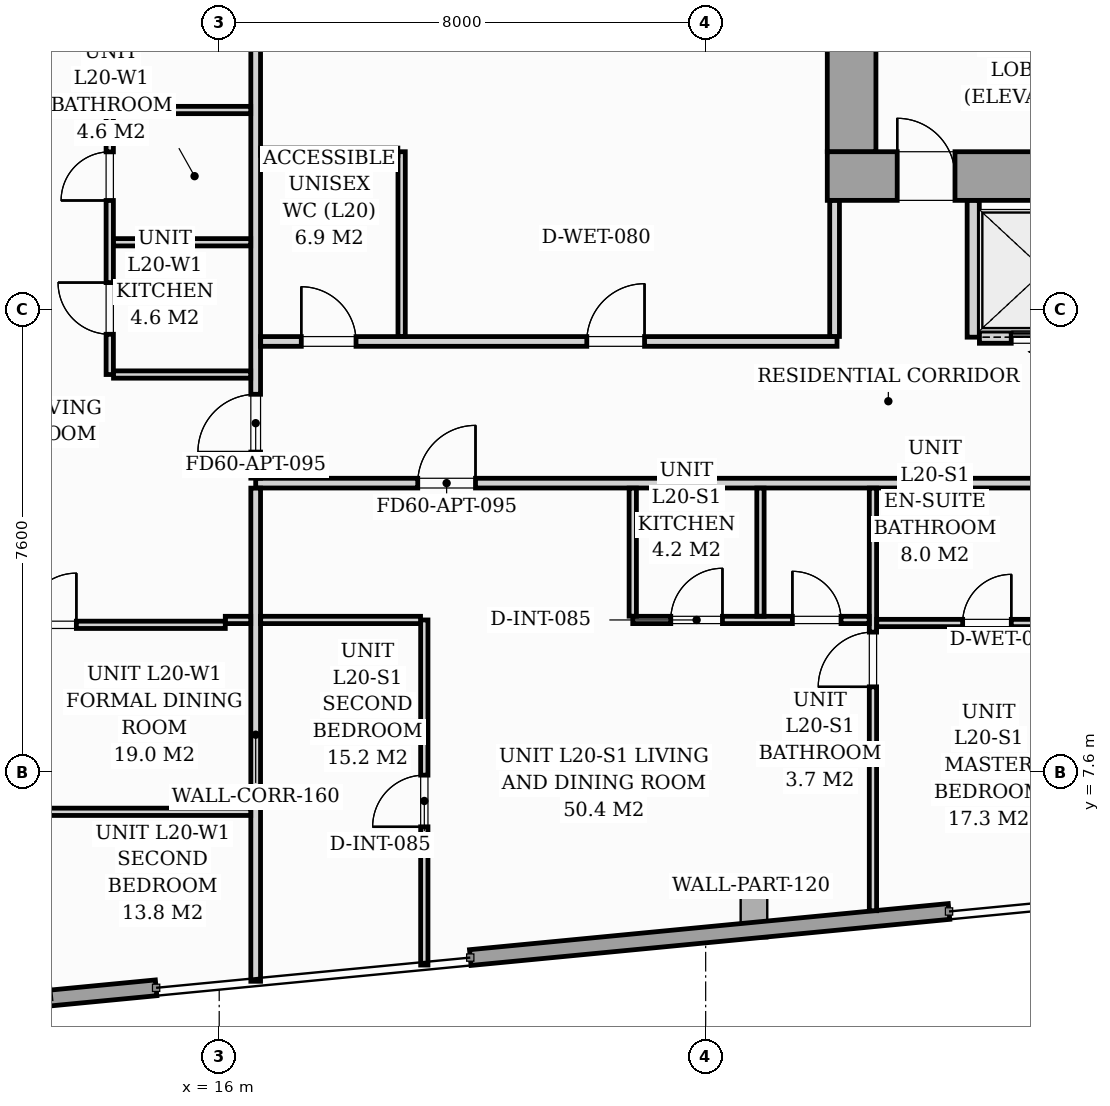
"""IFC4 building model, lengths in metres.
Left out: names, types, materials, properties, quantities, classifications, styles, units other than length and angle.
Written with IfcOpenShell. Run it as: python <this file> out.ifc"""

import sys

from ifc_helpers import new_model, si_unit, direction, frame, frame_2d, origin, origin_2d, place, context, subcontext, project, spatial, rectangle, i_section, extrude, source, transform, mapped, element, fill, save


model = new_model("IFC4")
c1 = context("Model", 3, precision=1e-05, world=origin(), true_north=direction((0.0, 1.0)))
c2 = subcontext(c1, "Body", "Model", "MODEL_VIEW")
j1 = project(units=[si_unit("LENGTHUNIT", "METRE"), si_unit("PLANEANGLEUNIT", "RADIAN")], contexts=[c1])
p1 = place(None, origin())
s1 = spatial("IfcSite", under=j1, at=p1, CompositionType="ELEMENT")
p2 = place(p1, origin())
s2 = spatial("IfcBuilding", under=s1, at=p2, CompositionType="ELEMENT")
p3 = place(p2, frame((0.0, 0.0, 72.6)))
s3 = spatial("IfcBuildingStorey", under=s2, at=p3, CompositionType="ELEMENT", Elevation=72.6)
m1 = source(origin(), c2, "Body", "SweptSolid", [
    extrude(i_section(OverallWidth=0.427, OverallDepth=0.483, WebThickness=0.051, FlangeThickness=0.082, FilletRadius=0.018, at=origin_2d()), origin(), (0.0, 0.0, 1.0), 5.196),
])
p4 = place(p3, frame((26.4, 17.4, 0.002), z_axis=(0.0, 0.0, 1.0), x_axis=(1.0, 0.0, 0.0)))
e1 = element("IfcColumn", 1, at=p4, inside=s3, PredefinedType="PILASTER", context=c2, shape_type="MappedRepresentation", body=[
    mapped(m1, transform((0.0, 0.0, 0.0), scale=1.0)),
])
m2 = source(origin(), c2, "Body", "SweptSolid", [
    extrude(i_section(OverallWidth=0.438, OverallDepth=1.011, WebThickness=0.041, FlangeThickness=0.074, FilletRadius=0.024, at=origin_2d()), origin(), (0.0, 0.0, 1.0), 5.085),
])
p5 = place(p3, frame((11.735, 4.458, 0.108), z_axis=(0.428528444191, 0.106003899258, 0.897288440727), x_axis=(-0.871034557512, -0.215465415974, 0.44144473509)))
e2 = element("IfcColumn", 2, at=p5, inside=s3, PredefinedType="COLUMN", context=c2, shape_type="MappedRepresentation", body=[
    mapped(m2, transform((0.0, 0.0, 0.0), scale=1.0)),
])
m3 = source(origin(), c2, "Body", "SweptSolid", [
    extrude(i_section(OverallWidth=0.438, OverallDepth=1.011, WebThickness=0.041, FlangeThickness=0.074, FilletRadius=0.024, at=origin_2d()), origin(), (0.0, 0.0, 1.0), 5.424),
])
p6 = place(p3, frame((24.135, 5.106, 0.133), z_axis=(0.514107031912, 0.207605431326, 0.832222292793), x_axis=(-0.771678997149, -0.311617505897, 0.554442111837)))
e3 = element("IfcColumn", 3, at=p6, inside=s3, PredefinedType="COLUMN", context=c2, shape_type="MappedRepresentation", body=[
    mapped(m3, transform((0.0, 0.0, 0.0), scale=1.0)),
])
p7 = place(p3, frame((28.002, 5.306, 0.0), z_axis=(0.0, 0.0, 1.0), x_axis=(-0.9953942011, -0.09586649267, 0.0)))
e4 = element("IfcWall", 4, at=p7, inside=s3, PredefinedType="STANDARD", context=c2, shape_type="SweptSolid", body=[
    extrude(rectangle(XDim=7.91, YDim=0.26, at=frame_2d((3.955, 0.0))), origin(), (0.0, 0.0, 1.0), 4.78),
])
p8 = place(p3, frame((14.962, 4.051, 0.0), z_axis=(0.0, 0.0, 1.0), x_axis=(-0.995397839199, -0.095828710298, 0.0)))
e5 = element("IfcWall", 5, at=p8, inside=s3, PredefinedType="STANDARD", context=c2, shape_type="SweptSolid", body=[
    extrude(rectangle(XDim=2.0, YDim=0.26, at=frame_2d((1.0, 0.0))), origin(), (0.0, 0.0, 1.0), 4.78),
])
p9 = place(p3, frame((26.0, 17.4, 0.0), z_axis=(0.0, 0.0, 1.0), x_axis=(1.0, 0.0, 0.0)))
e6 = element("IfcWall", 6, at=p9, inside=s3, PredefinedType="SHEAR", context=c2, shape_type="SweptSolid", body=[
    extrude(rectangle(XDim=20.0, YDim=0.8, at=frame_2d((10.0, 0.0))), origin(), (0.0, 0.0, 1.0), 5.2),
])
p10 = place(p9, frame((1.15, 0.0, 0.0)))
e7 = element("IfcOpeningElement", 7, at=p10, cuts=e6, PredefinedType="OPENING", context=c2, shape_type="SweptSolid", body=[
    extrude(rectangle(XDim=0.95, YDim=2.06, at=frame_2d((0.475, 1.03))), frame((0.0, 0.41, 0.0), z_axis=(0.0, -1.0, 0.0), x_axis=(1.0, 0.0, 0.0)), (0.0, 0.0, 1.0), 0.82),
])
p11 = place(p9, frame((9.58, 0.0, 0.0)))
e8 = element("IfcOpeningElement", 8, at=p11, cuts=e6, PredefinedType="OPENING", context=c2, shape_type="SweptSolid", body=[
    extrude(rectangle(XDim=0.9, YDim=2.06, at=frame_2d((0.45, 1.03))), frame((0.0, 0.41, 0.0), z_axis=(0.0, -1.0, 0.0), x_axis=(1.0, 0.0, 0.0)), (0.0, 0.0, 1.0), 0.82),
])
p12 = place(p9, frame((17.75, 0.0, 0.0)))
e9 = element("IfcOpeningElement", 9, at=p12, cuts=e6, PredefinedType="OPENING", context=c2, shape_type="SweptSolid", body=[
    extrude(rectangle(XDim=0.95, YDim=2.06, at=frame_2d((0.475, 1.03))), frame((0.0, 0.41, 0.0), z_axis=(0.0, -1.0, 0.0), x_axis=(1.0, 0.0, 0.0)), (0.0, 0.0, 1.0), 0.82),
])
p13 = place(p3, frame((26.4, 17.802, 0.0), z_axis=(0.0, 0.0, 1.0), x_axis=(0.0, 1.0, 0.0)))
e10 = element("IfcWall", 10, at=p13, inside=s3, PredefinedType="SHEAR", context=c2, shape_type="SweptSolid", body=[
    extrude(rectangle(XDim=5.796, YDim=0.8, at=frame_2d((2.898, 0.0))), origin(), (0.0, 0.0, 1.0), 5.2),
])
p14 = place(p3, frame((28.4, 14.75, 0.0), z_axis=(0.0, 0.0, 1.0), x_axis=(0.0, 1.0, 0.0)))
e11 = element("IfcWall", 11, at=p14, inside=s3, PredefinedType="PARTITIONING", context=c2, shape_type="SweptSolid", body=[
    extrude(rectangle(XDim=2.248, YDim=0.2, at=frame_2d((1.124, 0.0))), origin(), (0.0, 0.0, 1.0), 4.78),
])
p15 = place(p3, frame((28.502, 14.75, 0.0), z_axis=(0.0, 0.0, 1.0), x_axis=(1.0, 0.0, 0.0)))
e12 = element("IfcWall", 12, at=p15, inside=s3, PredefinedType="PARTITIONING", context=c2, shape_type="SweptSolid", body=[
    extrude(rectangle(XDim=2.146, YDim=0.2, at=frame_2d((1.073, 0.0))), origin(), (0.0, 0.0, 1.0), 4.78),
])
p16 = place(p15, frame((0.523, 0.0, 0.0)))
e13 = element("IfcOpeningElement", 13, at=p16, cuts=e12, PredefinedType="OPENING", context=c2, shape_type="SweptSolid", body=[
    extrude(rectangle(XDim=1.05, YDim=2.08, at=frame_2d((0.525, 1.04))), frame((0.0, 0.11, 0.0), z_axis=(0.0, -1.0, 0.0), x_axis=(1.0, 0.0, 0.0)), (0.0, 0.0, 1.0), 0.22),
])
p17 = place(p3, frame((16.6, 12.35, 0.0), z_axis=(0.0, 0.0, 1.0), x_axis=(1.0, 0.0, 0.0)))
e14 = element("IfcWall", 14, at=p17, inside=s3, PredefinedType="PARTITIONING", context=c2, shape_type="SweptSolid", body=[
    extrude(rectangle(XDim=37.6, YDim=0.16, at=frame_2d((18.8, 0.0))), origin(), (0.0, 0.0, 1.0), 4.78),
])
p18 = place(p17, frame((2.665, 0.0, 0.0)))
e15 = element("IfcOpeningElement", 15, at=p18, cuts=e14, PredefinedType="OPENING", context=c2, shape_type="SweptSolid", body=[
    extrude(rectangle(XDim=0.95, YDim=2.06, at=frame_2d((0.475, 1.03))), frame((0.0, 0.09, 0.0), z_axis=(0.0, -1.0, 0.0), x_axis=(1.0, 0.0, 0.0)), (0.0, 0.0, 1.0), 0.18),
])
p19 = place(p17, frame((26.146, 0.0, 0.0)))
e16 = element("IfcOpeningElement", 16, at=p19, cuts=e14, PredefinedType="OPENING", context=c2, shape_type="SweptSolid", body=[
    extrude(rectangle(XDim=0.95, YDim=2.06, at=frame_2d((0.475, 1.03))), frame((0.0, 0.09, 0.0), z_axis=(0.0, -1.0, 0.0), x_axis=(1.0, 0.0, 0.0)), (0.0, 0.0, 1.0), 0.18),
])
p20 = place(p3, frame((16.6, 4.158, 0.0), z_axis=(0.0, 0.0, 1.0), x_axis=(0.0, 1.0, 0.0)))
e17 = element("IfcWall", 17, at=p20, inside=s3, PredefinedType="PARTITIONING", context=c2, shape_type="SweptSolid", body=[
    extrude(rectangle(XDim=8.11, YDim=0.16, at=frame_2d((4.055, 0.0))), origin(), (0.0, 0.0, 1.0), 4.78),
])
p21 = place(p3, frame((16.6, 12.432, 0.0), z_axis=(0.0, 0.0, 1.0), x_axis=(0.0, 1.0, 0.0)))
e18 = element("IfcWall", 18, at=p21, inside=s3, PredefinedType="PARTITIONING", context=c2, shape_type="SweptSolid", body=[
    extrude(rectangle(XDim=11.658, YDim=0.16, at=frame_2d((5.829, 0.0))), origin(), (0.0, 0.0, 1.0), 4.78),
])
p22 = place(p21, frame((0.429, 0.0, 0.0)))
e19 = element("IfcOpeningElement", 19, at=p22, cuts=e18, PredefinedType="OPENING", context=c2, shape_type="SweptSolid", body=[
    extrude(rectangle(XDim=0.95, YDim=2.06, at=frame_2d((0.475, 1.03))), frame((0.0, 0.09, 0.0), z_axis=(0.0, -1.0, 0.0), x_axis=(1.0, 0.0, 0.0)), (0.0, 0.0, 1.0), 0.18),
])
p23 = place(p3, frame((26.751, 5.318, 0.0), z_axis=(0.0, 0.0, 1.0), x_axis=(0.0, 1.0, 0.0)))
e20 = element("IfcWall", 20, at=p23, inside=s3, PredefinedType="PARTITIONING", context=c2, shape_type="SweptSolid", body=[
    extrude(rectangle(XDim=6.95, YDim=0.12, at=frame_2d((3.475, 0.0))), origin(), (0.0, 0.0, 1.0), 4.055),
])
p24 = place(p23, frame((3.682, 0.0, 0.0)))
e21 = element("IfcOpeningElement", 21, at=p24, cuts=e20, PredefinedType="OPENING", context=c2, shape_type="SweptSolid", body=[
    extrude(rectangle(XDim=0.9, YDim=2.05, at=frame_2d((0.45, 1.025))), frame((0.0, 0.07, 0.0), z_axis=(0.0, -1.0, 0.0), x_axis=(1.0, 0.0, 0.0)), (0.0, 0.0, 1.0), 0.14),
])
p25 = place(p3, frame((22.801, 10.1, 0.0), z_axis=(0.0, 0.0, 1.0), x_axis=(1.0, 0.0, 0.0)))
e22 = element("IfcWall", 22, at=p25, inside=s3, PredefinedType="PARTITIONING", context=c2, shape_type="SweptSolid", body=[
    extrude(rectangle(XDim=3.888, YDim=0.12, at=frame_2d((1.944, 0.0))), origin(), (0.0, 0.0, 1.0), 4.78),
])
p26 = place(p25, frame((0.625, 0.0, 0.0)))
e23 = element("IfcOpeningElement", 23, at=p26, cuts=e22, PredefinedType="OPENING", context=c2, shape_type="SweptSolid", body=[
    extrude(rectangle(XDim=0.85, YDim=2.05, at=frame_2d((0.425, 1.025))), frame((0.0, 0.07, 0.0), z_axis=(0.0, -1.0, 0.0), x_axis=(1.0, 0.0, 0.0)), (0.0, 0.0, 1.0), 0.14),
])
p27 = place(p25, frame((2.625, 0.0, 0.0)))
e24 = element("IfcOpeningElement", 24, at=p27, cuts=e22, PredefinedType="OPENING", context=c2, shape_type="SweptSolid", body=[
    extrude(rectangle(XDim=0.8, YDim=2.02, at=frame_2d((0.4, 1.01))), frame((0.0, 0.07, 0.0), z_axis=(0.0, -1.0, 0.0), x_axis=(1.0, 0.0, 0.0)), (0.0, 0.0, 1.0), 0.14),
])
for number, where, z_axis, x_axis in (
    (25, (24.901, 10.162, 0.0), (0.0, 0.0, 1.0), (0.0, 1.0, 0.0)),
    (26, (22.801, 10.162, 0.0), (0.0, 0.0, 1.0), (0.0, 1.0, 0.0)),
):
    element("IfcWall", number, at=place(p3, frame(where, z_axis=z_axis, x_axis=x_axis)), inside=s3, PredefinedType="PARTITIONING", context=c2, shape_type="SweptSolid", body=[
        extrude(rectangle(XDim=2.106, YDim=0.12, at=frame_2d((1.053, 0.0))), origin(), (0.0, 0.0, 1.0), 4.78),
    ])
p28 = place(p3, frame((26.813, 10.05, 0.0), z_axis=(0.0, 0.0, 1.0), x_axis=(1.0, 0.0, 0.0)))
e27 = element("IfcWall", 27, at=p28, inside=s3, PredefinedType="PARTITIONING", context=c2, shape_type="SweptSolid", body=[
    extrude(rectangle(XDim=3.788, YDim=0.12, at=frame_2d((1.894, 0.0))), origin(), (0.0, 0.0, 1.0), 4.78),
])
p29 = place(p28, frame((1.413, 0.0, 0.0)))
e28 = element("IfcOpeningElement", 28, at=p29, cuts=e27, PredefinedType="OPENING", context=c2, shape_type="SweptSolid", body=[
    extrude(rectangle(XDim=0.8, YDim=2.02, at=frame_2d((0.4, 1.01))), frame((0.0, 0.07, 0.0), z_axis=(0.0, -1.0, 0.0), x_axis=(1.0, 0.0, 0.0)), (0.0, 0.0, 1.0), 0.14),
])
p30 = place(p3, frame((19.373, 4.425, 0.0), z_axis=(0.0, 0.0, 1.0), x_axis=(0.0, 1.0, 0.0)))
e29 = element("IfcWall", 29, at=p30, inside=s3, PredefinedType="PARTITIONING", context=c2, shape_type="SweptSolid", body=[
    extrude(rectangle(XDim=5.675, YDim=0.12, at=frame_2d((2.837, 0.0))), origin(), (0.0, 0.0, 1.0), 4.78),
])
p31 = place(p30, frame((2.273, 0.0, 0.0)))
e30 = element("IfcOpeningElement", 30, at=p31, cuts=e29, PredefinedType="OPENING", context=c2, shape_type="SweptSolid", body=[
    extrude(rectangle(XDim=0.85, YDim=2.05, at=frame_2d((0.425, 1.025))), frame((0.0, 0.07, 0.0), z_axis=(0.0, -1.0, 0.0), x_axis=(1.0, 0.0, 0.0)), (0.0, 0.0, 1.0), 0.14),
])
p32 = place(p3, frame((16.1, 10.1, 0.0), z_axis=(0.0, 0.0, 1.0), x_axis=(1.0, 0.0, 0.0)))
e31 = element("IfcWall", 31, at=p32, inside=s3, PredefinedType="PARTITIONING", context=c2, shape_type="SweptSolid", body=[
    extrude(rectangle(XDim=0.418, YDim=0.12, at=frame_2d((0.209, 0.0))), origin(), (0.0, 0.0, 1.0), 4.78),
])
p33 = place(p3, frame((16.682, 10.1, 0.0), z_axis=(0.0, 0.0, 1.0), x_axis=(1.0, 0.0, 0.0)))
e32 = element("IfcWall", 32, at=p33, inside=s3, PredefinedType="PARTITIONING", context=c2, shape_type="SweptSolid", body=[
    extrude(rectangle(XDim=2.629, YDim=0.12, at=frame_2d((1.314, 0.0))), origin(), (0.0, 0.0, 1.0), 4.78),
])
p34 = place(p3, frame((14.2, 14.136, 0.0), z_axis=(0.0, 0.0, 1.0), x_axis=(0.0, 1.0, 0.0)))
e33 = element("IfcWall", 33, at=p34, inside=s3, PredefinedType="PARTITIONING", context=c2, shape_type="SweptSolid", body=[
    extrude(rectangle(XDim=4.35, YDim=0.12, at=frame_2d((2.175, 0.0))), origin(), (0.0, 0.0, 1.0), 4.78),
])
p35 = place(p34, frame((0.662, 0.0, 0.0)))
e34 = element("IfcOpeningElement", 34, at=p35, cuts=e33, PredefinedType="OPENING", context=c2, shape_type="SweptSolid", body=[
    extrude(rectangle(XDim=0.85, YDim=2.05, at=frame_2d((0.425, 1.025))), frame((0.0, 0.07, 0.0), z_axis=(0.0, -1.0, 0.0), x_axis=(1.0, 0.0, 0.0)), (0.0, 0.0, 1.0), 0.14),
])
p36 = place(p34, frame((2.862, 0.0, 0.0)))
e35 = element("IfcOpeningElement", 35, at=p36, cuts=e33, PredefinedType="OPENING", context=c2, shape_type="SweptSolid", body=[
    extrude(rectangle(XDim=0.8, YDim=2.02, at=frame_2d((0.4, 1.01))), frame((0.0, 0.07, 0.0), z_axis=(0.0, -1.0, 0.0), x_axis=(1.0, 0.0, 0.0)), (0.0, 0.0, 1.0), 0.14),
])
for number, where, z_axis, x_axis in (
    (36, (14.262, 16.311, 0.0), (0.0, 0.0, 1.0), (1.0, 0.0, 0.0)),
    (37, (14.262, 14.136, 0.0), (0.0, 0.0, 1.0), (1.0, 0.0, 0.0)),
    (38, (14.262, 18.486, 0.0), (0.0, 0.0, 1.0), (1.0, 0.0, 0.0)),
):
    element("IfcWall", number, at=place(p3, frame(where, z_axis=z_axis, x_axis=x_axis)), inside=s3, PredefinedType="PARTITIONING", context=c2, shape_type="SweptSolid", body=[
        extrude(rectangle(XDim=2.256, YDim=0.12, at=frame_2d((1.128, 0.0))), origin(), (0.0, 0.0, 1.0), 4.78),
    ])
p37 = place(p3, frame((10.426, 6.945, 0.0), z_axis=(0.0, 0.0, 1.0), x_axis=(1.0, 0.0, 0.0)))
e39 = element("IfcWall", 39, at=p37, inside=s3, PredefinedType="PARTITIONING", context=c2, shape_type="SweptSolid", body=[
    extrude(rectangle(XDim=6.092, YDim=0.12, at=frame_2d((3.046, 0.0))), origin(), (0.0, 0.0, 1.0), 4.78),
])
p38 = place(p37, frame((1.46, 0.0, 0.0)))
e40 = element("IfcOpeningElement", 40, at=p38, cuts=e39, PredefinedType="OPENING", context=c2, shape_type="SweptSolid", body=[
    extrude(rectangle(XDim=0.85, YDim=2.05, at=frame_2d((0.425, 1.025))), frame((0.0, 0.07, 0.0), z_axis=(0.0, -1.0, 0.0), x_axis=(1.0, 0.0, 0.0)), (0.0, 0.0, 1.0), 0.14),
])
p39 = place(p3, frame((10.13, 10.02, 0.0), z_axis=(0.0, 0.0, 1.0), x_axis=(1.0, 0.0, 0.0)))
e41 = element("IfcWall", 41, at=p39, inside=s3, PredefinedType="PARTITIONING", context=c2, shape_type="SweptSolid", body=[
    extrude(rectangle(XDim=5.97, YDim=0.12, at=frame_2d((2.985, 0.0))), origin(), (0.0, 0.0, 1.0), 4.78),
])
p40 = place(p39, frame((2.671, 0.0, 0.0)))
e42 = element("IfcOpeningElement", 42, at=p40, cuts=e41, PredefinedType="OPENING", context=c2, shape_type="SweptSolid", body=[
    extrude(rectangle(XDim=0.85, YDim=2.05, at=frame_2d((0.425, 1.025))), frame((0.0, 0.07, 0.0), z_axis=(0.0, -1.0, 0.0), x_axis=(1.0, 0.0, 0.0)), (0.0, 0.0, 1.0), 0.14),
])
p41 = place(p3, frame((16.682, 14.68, 0.0), z_axis=(0.0, 0.0, 1.0), x_axis=(1.0, 0.0, 0.0)))
e43 = element("IfcWall", 43, at=p41, inside=s3, PredefinedType="PARTITIONING", context=c2, shape_type="SweptSolid", body=[
    extrude(rectangle(XDim=9.478, YDim=0.16, at=frame_2d((4.739, 0.0))), origin(), (0.0, 0.0, 1.0), 4.78),
])
p42 = place(p41, frame((0.668, 0.0, 0.0)))
e44 = element("IfcOpeningElement", 44, at=p42, cuts=e43, PredefinedType="OPENING", context=c2, shape_type="SweptSolid", body=[
    extrude(rectangle(XDim=0.9, YDim=2.05, at=frame_2d((0.45, 1.025))), frame((0.0, 0.09, 0.0), z_axis=(0.0, -1.0, 0.0), x_axis=(1.0, 0.0, 0.0)), (0.0, 0.0, 1.0), 0.18),
])
p43 = place(p41, frame((5.363, 0.0, 0.0)))
e45 = element("IfcOpeningElement", 45, at=p43, cuts=e43, PredefinedType="OPENING", context=c2, shape_type="SweptSolid", body=[
    extrude(rectangle(XDim=0.95, YDim=2.06, at=frame_2d((0.475, 1.03))), frame((0.0, 0.09, 0.0), z_axis=(0.0, -1.0, 0.0), x_axis=(1.0, 0.0, 0.0)), (0.0, 0.0, 1.0), 0.18),
])
p44 = place(p3, frame((26.12, 14.762, 0.0), z_axis=(0.0, 0.0, 1.0), x_axis=(0.0, 1.0, 0.0)))
e46 = element("IfcWall", 46, at=p44, inside=s3, PredefinedType="PARTITIONING", context=c2, shape_type="SweptSolid", body=[
    extrude(rectangle(XDim=2.236, YDim=0.16, at=frame_2d((1.118, 0.0))), origin(), (0.0, 0.0, 1.0), 4.78),
])
p45 = place(p3, frame((19.0, 14.762, 0.0), z_axis=(0.0, 0.0, 1.0), x_axis=(0.0, 1.0, 0.0)))
e47 = element("IfcWall", 47, at=p45, inside=s3, PredefinedType="PARTITIONING", context=c2, shape_type="SweptSolid", body=[
    extrude(rectangle(XDim=3.038, YDim=0.12, at=frame_2d((1.519, 0.0))), origin(), (0.0, 0.0, 1.0), 4.78),
])
p46 = place(p3, frame((16.682, 17.8, 0.0), z_axis=(0.0, 0.0, 1.0), x_axis=(1.0, 0.0, 0.0)))
e48 = element("IfcWall", 48, at=p46, inside=s3, PredefinedType="PARTITIONING", context=c2, shape_type="SweptSolid", body=[
    extrude(rectangle(XDim=2.256, YDim=0.12, at=frame_2d((1.128, 0.0))), origin(), (0.0, 0.0, 1.0), 4.78),
])
m4 = source(origin(), c2, "Body", "SweptSolid", [
    extrude(rectangle(XDim=0.95, YDim=2.06, at=frame_2d((0.475, 1.03))), frame((0.0, 0.025, 0.0), z_axis=(0.0, -1.0, 0.0), x_axis=(1.0, 0.0, 0.0)), (0.0, 0.0, 1.0), 0.05),
])
p47 = place(p10, origin())
e49 = element("IfcDoor", 49, at=p47, inside=s3, OperationType="SINGLE_SWING_LEFT", PredefinedType="DOOR", context=c2, shape_type="MappedRepresentation", body=[
    mapped(m4, transform((0.0, 0.0, 0.0), scale=1.0)),
])
fill(e7, e49)
m5 = source(origin(), c2, "Body", "SweptSolid", [
    extrude(rectangle(XDim=1.05, YDim=2.08, at=frame_2d((0.525, 1.04))), frame((0.0, 0.025, 0.0), z_axis=(0.0, -1.0, 0.0), x_axis=(1.0, 0.0, 0.0)), (0.0, 0.0, 1.0), 0.05),
])
p48 = place(p16, origin())
e50 = element("IfcDoor", 50, at=p48, inside=s3, OperationType="SLIDING_TO_LEFT", PredefinedType="DOOR", context=c2, shape_type="MappedRepresentation", body=[
    mapped(m5, transform((0.0, 0.0, 0.0), scale=1.0)),
])
fill(e13, e50)
m6 = source(origin(), c2, "Body", "SweptSolid", [
    extrude(rectangle(XDim=0.8, YDim=2.02, at=frame_2d((0.4, 1.01))), frame((0.0, 0.025, 0.0), z_axis=(0.0, -1.0, 0.0), x_axis=(1.0, 0.0, 0.0)), (0.0, 0.0, 1.0), 0.05),
])
p49 = place(p29, origin())
e51 = element("IfcDoor", 51, at=p49, inside=s3, OperationType="SINGLE_SWING_RIGHT", PredefinedType="DOOR", context=c2, shape_type="MappedRepresentation", body=[
    mapped(m6, transform((0.0, 0.0, 0.0), scale=1.0)),
])
fill(e28, e51)
m7 = source(origin(), c2, "Body", "SweptSolid", [
    extrude(rectangle(XDim=0.85, YDim=2.05, at=frame_2d((0.425, 1.025))), frame((0.0, 0.025, 0.0), z_axis=(0.0, -1.0, 0.0), x_axis=(1.0, 0.0, 0.0)), (0.0, 0.0, 1.0), 0.05),
])
p50 = place(p31, origin())
e52 = element("IfcDoor", 52, at=p50, inside=s3, OperationType="SINGLE_SWING_LEFT", PredefinedType="DOOR", context=c2, shape_type="MappedRepresentation", body=[
    mapped(m7, transform((0.0, 0.0, 0.0), scale=1.0)),
])
fill(e30, e52)
m8 = source(origin(), c2, "Body", "SweptSolid", [
    extrude(rectangle(XDim=0.95, YDim=2.06, at=frame_2d((0.475, 1.03))), frame((0.0, 0.025, 0.0), z_axis=(0.0, -1.0, 0.0), x_axis=(1.0, 0.0, 0.0)), (0.0, 0.0, 1.0), 0.05),
])
p51 = place(p18, origin())
e53 = element("IfcDoor", 53, at=p51, inside=s3, OperationType="SINGLE_SWING_RIGHT", PredefinedType="DOOR", context=c2, shape_type="MappedRepresentation", body=[
    mapped(m8, transform((0.0, 0.0, 0.0), scale=1.0)),
])
fill(e15, e53)
m9 = source(origin(), c2, "Body", "SweptSolid", [
    extrude(rectangle(XDim=0.9, YDim=2.05, at=frame_2d((0.45, 1.025))), frame((0.0, 0.025, 0.0), z_axis=(0.0, -1.0, 0.0), x_axis=(1.0, 0.0, 0.0)), (0.0, 0.0, 1.0), 0.05),
])
p52 = place(p24, origin())
e54 = element("IfcDoor", 54, at=p52, inside=s3, OperationType="SINGLE_SWING_LEFT", PredefinedType="DOOR", context=c2, shape_type="MappedRepresentation", body=[
    mapped(m9, transform((0.0, 0.0, 0.0), scale=1.0)),
])
fill(e21, e54)
p53 = place(p26, origin())
e55 = element("IfcDoor", 55, at=p53, inside=s3, OperationType="SINGLE_SWING_RIGHT", PredefinedType="DOOR", context=c2, shape_type="MappedRepresentation", body=[
    mapped(m7, transform((0.0, 0.0, 0.0), scale=1.0)),
])
fill(e23, e55)
p54 = place(p27, origin())
e56 = element("IfcDoor", 56, at=p54, inside=s3, OperationType="SINGLE_SWING_LEFT", PredefinedType="DOOR", context=c2, shape_type="MappedRepresentation", body=[
    mapped(m6, transform((0.0, 0.0, 0.0), scale=1.0)),
])
fill(e24, e56)
p55 = place(p22, origin())
e57 = element("IfcDoor", 57, at=p55, inside=s3, OperationType="SINGLE_SWING_LEFT", PredefinedType="DOOR", context=c2, shape_type="MappedRepresentation", body=[
    mapped(m8, transform((0.0, 0.0, 0.0), scale=1.0)),
])
fill(e19, e57)
p56 = place(p35, origin())
e58 = element("IfcDoor", 58, at=p56, inside=s3, OperationType="SINGLE_SWING_RIGHT", PredefinedType="DOOR", context=c2, shape_type="MappedRepresentation", body=[
    mapped(m7, transform((0.0, 0.0, 0.0), scale=1.0)),
])
fill(e34, e58)
p57 = place(p36, origin())
e59 = element("IfcDoor", 59, at=p57, inside=s3, OperationType="SINGLE_SWING_LEFT", PredefinedType="DOOR", context=c2, shape_type="MappedRepresentation", body=[
    mapped(m6, transform((0.0, 0.0, 0.0), scale=1.0)),
])
fill(e35, e59)
p58 = place(p40, origin())
e60 = element("IfcDoor", 60, at=p58, inside=s3, OperationType="SINGLE_SWING_RIGHT", PredefinedType="DOOR", context=c2, shape_type="MappedRepresentation", body=[
    mapped(m7, transform((0.0, 0.0, 0.0), scale=1.0)),
])
fill(e42, e60)
p59 = place(p42, origin())
e61 = element("IfcDoor", 61, at=p59, inside=s3, OperationType="SINGLE_SWING_LEFT", PredefinedType="DOOR", context=c2, shape_type="MappedRepresentation", body=[
    mapped(m9, transform((0.0, 0.0, 0.0), scale=1.0)),
])
fill(e44, e61)
p60 = place(p43, origin())
e62 = element("IfcDoor", 62, at=p60, inside=s3, OperationType="SINGLE_SWING_RIGHT", PredefinedType="DOOR", context=c2, shape_type="MappedRepresentation", body=[
    mapped(m8, transform((0.0, 0.0, 0.0), scale=1.0)),
])
fill(e45, e62)
save(model, sys.argv[1])
